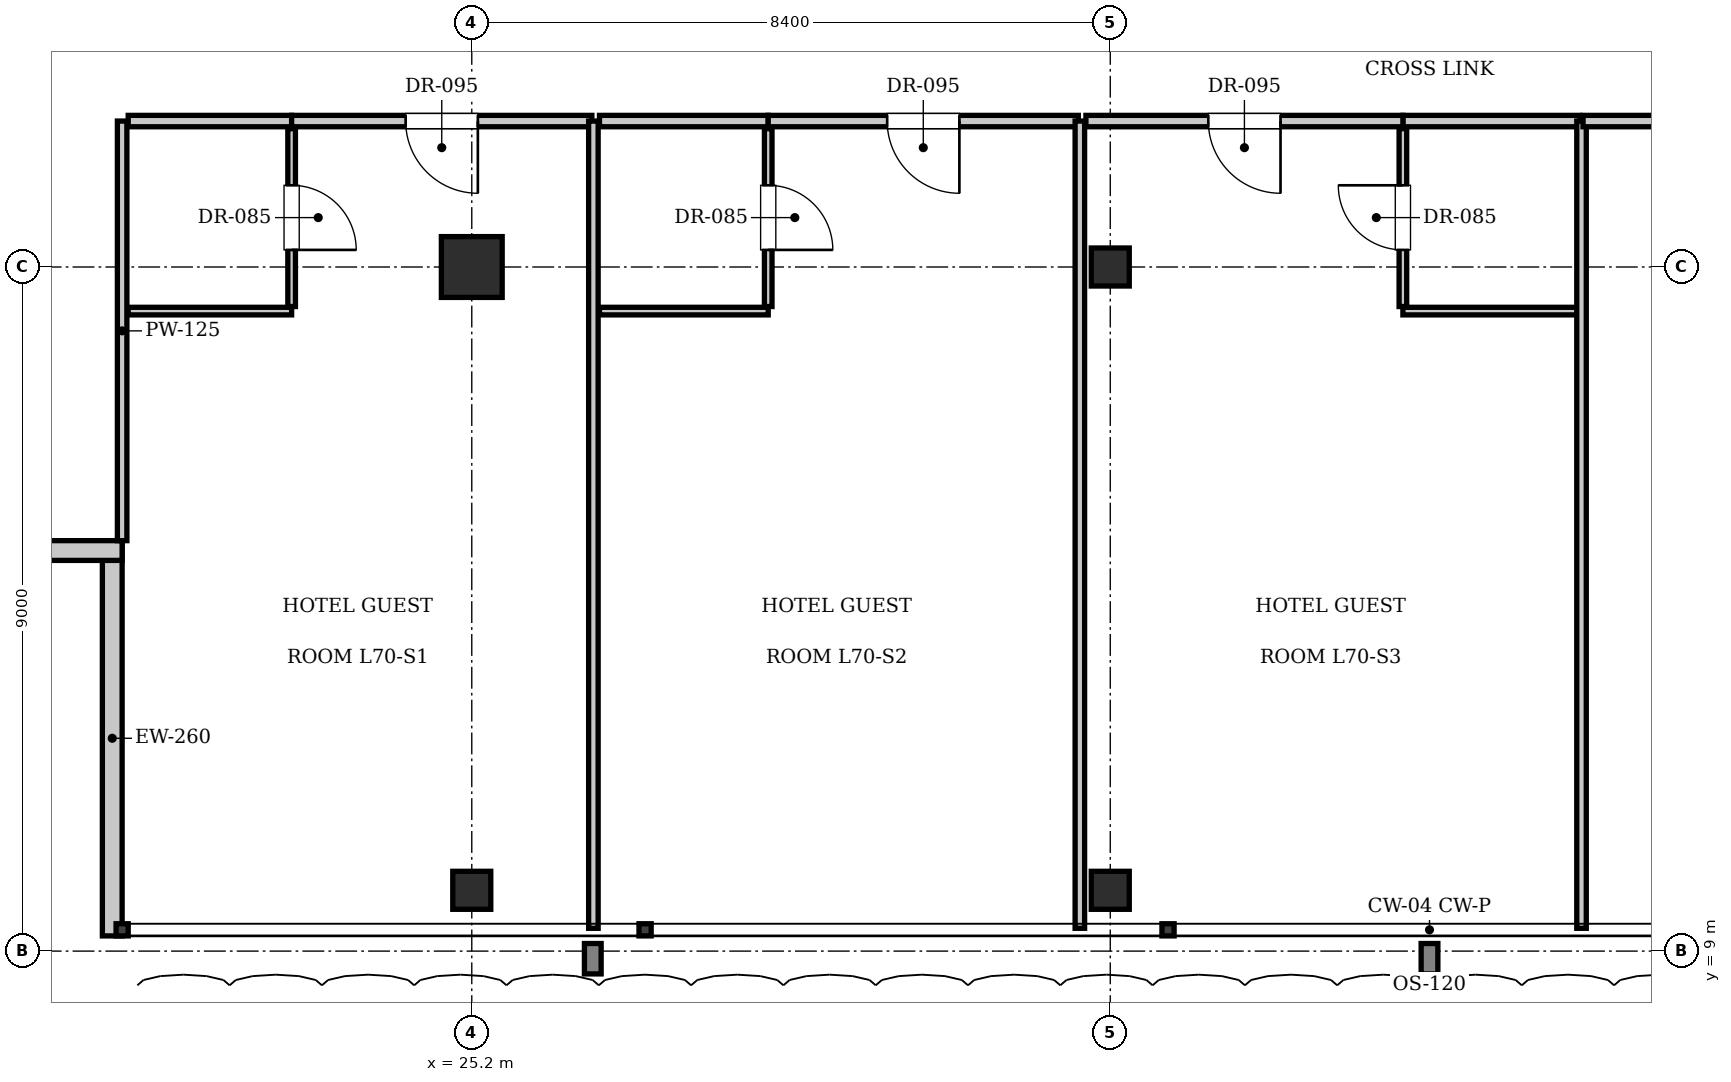
"""IFC4 building model, lengths in metres.
Left out: names, types, materials, properties, quantities, classifications, styles, units other than length and angle.
Written with IfcOpenShell. Run it as: python <this file> out.ifc"""

import sys

from ifc_helpers import new_model, si_unit, direction, frame, frame_2d, origin, origin_2d, place, context, subcontext, project, spatial, rectangle, i_section, extrude, element, fill, save


model = new_model("IFC4")
c1 = context("Model", 3, precision=1e-05, world=origin(), true_north=direction((0.0, 1.0)))
c2 = subcontext(c1, "Body", "Model", "MODEL_VIEW")
j1 = project(units=[si_unit("LENGTHUNIT", "METRE"), si_unit("PLANEANGLEUNIT", "RADIAN")], contexts=[c1])
p1 = place(None, origin())
s1 = spatial("IfcSite", under=j1, at=p1, CompositionType="ELEMENT")
p2 = place(p1, origin())
s2 = spatial("IfcBuilding", under=s1, at=p2, CompositionType="ELEMENT")
p3 = place(p2, frame((0.0, 0.0, 285.6)))
s3 = spatial("IfcBuildingStorey", under=s2, at=p3, CompositionType="ELEMENT", Elevation=285.6)
p4 = place(p3, frame((25.2, 18.0, 0.0), z_axis=(0.0, 0.0, 1.0), x_axis=(1.0, 0.0, 0.0)))
e1 = element("IfcColumn", 1, at=p4, inside=s3, PredefinedType="COLUMN", context=c2, shape_type="SweptSolid", body=[
    extrude(rectangle(XDim=0.8, YDim=0.8, at=origin_2d()), origin(), (0.0, 0.0, 1.0), 3.85),
])
for number, where, z_axis, x_axis in (
    (2, (33.6, 18.0, 0.0), (0.0, 0.0, 1.0), (1.0, 0.0, 0.0)),
    (3, (25.2, 9.8, 0.0), (0.0, 0.0, 1.0), (1.0, 0.0, 0.0)),
    (4, (33.6, 9.8, 0.0), (0.0, 0.0, 1.0), (1.0, 0.0, 0.0)),
):
    element("IfcColumn", number, at=place(p3, frame(where, z_axis=z_axis, x_axis=x_axis)), inside=s3, PredefinedType="COLUMN", context=c2, shape_type="SweptSolid", body=[
        extrude(i_section(OverallWidth=0.5, OverallDepth=0.5, WebThickness=0.022, FlangeThickness=0.032, at=origin_2d()), origin(), (0.0, 0.0, 1.0), 3.85),
    ])
p5 = place(p3, frame((20.47, 9.2, 0.0), z_axis=(0.0, 0.0, 1.0), x_axis=(0.0, 1.0, 0.0)))
e5 = element("IfcWall", 5, at=p5, inside=s3, PredefinedType="SOLIDWALL", context=c2, shape_type="SweptSolid", body=[
    extrude(rectangle(XDim=5.2, YDim=0.26, at=frame_2d((2.6, 0.0))), origin(), (0.0, 0.0, 1.0), 3.61),
])
p6 = place(p3, frame((20.6, 14.27, 0.0), z_axis=(0.0, 0.0, 1.0), x_axis=(-1.0, 0.0, 0.0)))
e6 = element("IfcWall", 6, at=p6, inside=s3, PredefinedType="SOLIDWALL", context=c2, shape_type="SweptSolid", body=[
    extrude(rectangle(XDim=5.2, YDim=0.26, at=frame_2d((2.6, 0.0))), origin(), (0.0, 0.0, 1.0), 3.61),
])
p7 = place(p6, frame((1.6, 0.0, 0.9)))
e7 = element("IfcOpeningElement", 7, at=p7, cuts=e6, PredefinedType="OPENING", context=c2, shape_type="SweptSolid", body=[
    extrude(rectangle(XDim=2.0, YDim=2.2, at=frame_2d((1.0, 1.1))), frame((0.0, 0.14, 0.0), z_axis=(0.0, -1.0, 0.0), x_axis=(1.0, 0.0, 0.0)), (0.0, 0.0, 1.0), 0.28),
])
p8 = place(p3, frame((20.6, 14.4, 0.0), z_axis=(0.0, 0.0, 1.0), x_axis=(0.0, 1.0, 0.0)))
e8 = element("IfcWall", 8, at=p8, inside=s3, PredefinedType="PARTITIONING", context=c2, shape_type="SweptSolid", body=[
    extrude(rectangle(XDim=5.52, YDim=0.125, at=frame_2d((2.76, 0.0))), origin(), (0.0, 0.0, 1.0), 3.61),
])
p9 = place(p3, frame((20.68, 19.92, 0.0), z_axis=(0.0, 0.0, 1.0), x_axis=(1.0, 0.0, 0.0)))
e9 = element("IfcWall", 9, at=p9, inside=s3, PredefinedType="PARTITIONING", context=c2, shape_type="SweptSolid", body=[
    extrude(rectangle(XDim=2.15, YDim=0.15, at=frame_2d((1.075, 0.0))), origin(), (0.0, 0.0, 1.0), 3.61),
])
p10 = place(p3, frame((20.68, 17.42, 0.0), z_axis=(0.0, 0.0, 1.0), x_axis=(1.0, 0.0, 0.0)))
e10 = element("IfcWall", 10, at=p10, inside=s3, PredefinedType="PARTITIONING", context=c2, shape_type="SweptSolid", body=[
    extrude(rectangle(XDim=2.15, YDim=0.1, at=frame_2d((1.075, 0.0))), origin(), (0.0, 0.0, 1.0), 3.61),
])
p11 = place(p3, frame((22.83, 17.48, 0.0), z_axis=(0.0, 0.0, 1.0), x_axis=(0.0, 1.0, 0.0)))
e11 = element("IfcWall", 11, at=p11, inside=s3, PredefinedType="PARTITIONING", context=c2, shape_type="SweptSolid", body=[
    extrude(rectangle(XDim=2.34, YDim=0.1, at=frame_2d((1.17, 0.0))), origin(), (0.0, 0.0, 1.0), 3.61),
])
p12 = place(p11, frame((0.745, 0.0, 0.0)))
e12 = element("IfcOpeningElement", 12, at=p12, cuts=e11, PredefinedType="OPENING", context=c2, shape_type="SweptSolid", body=[
    extrude(rectangle(XDim=0.85, YDim=2.1, at=frame_2d((0.425, 1.05))), frame((0.0, 0.06, 0.0), z_axis=(0.0, -1.0, 0.0), x_axis=(1.0, 0.0, 0.0)), (0.0, 0.0, 1.0), 0.12),
])
p13 = place(p3, frame((22.83, 19.92, 0.0), z_axis=(0.0, 0.0, 1.0), x_axis=(1.0, 0.0, 0.0)))
e13 = element("IfcWall", 13, at=p13, inside=s3, PredefinedType="PARTITIONING", context=c2, shape_type="SweptSolid", body=[
    extrude(rectangle(XDim=3.95, YDim=0.15, at=frame_2d((1.975, 0.0))), origin(), (0.0, 0.0, 1.0), 3.61),
])
p14 = place(p13, frame((1.5, 0.0, 0.0)))
e14 = element("IfcOpeningElement", 14, at=p14, cuts=e13, PredefinedType="OPENING", context=c2, shape_type="SweptSolid", body=[
    extrude(rectangle(XDim=0.95, YDim=2.15, at=frame_2d((0.475, 1.075))), frame((0.0, 0.085, 0.0), z_axis=(0.0, -1.0, 0.0), x_axis=(1.0, 0.0, 0.0)), (0.0, 0.0, 1.0), 0.17),
])
p15 = place(p3, frame((26.8, 9.3, 0.0), z_axis=(0.0, 0.0, 1.0), x_axis=(0.0, 1.0, 0.0)))
e15 = element("IfcWall", 15, at=p15, inside=s3, PredefinedType="PARTITIONING", context=c2, shape_type="SweptSolid", body=[
    extrude(rectangle(XDim=10.62, YDim=0.125, at=frame_2d((5.31, 0.0))), origin(), (0.0, 0.0, 1.0), 3.61),
])
p16 = place(p3, frame((26.88, 19.92, 0.0), z_axis=(0.0, 0.0, 1.0), x_axis=(1.0, 0.0, 0.0)))
e16 = element("IfcWall", 16, at=p16, inside=s3, PredefinedType="PARTITIONING", context=c2, shape_type="SweptSolid", body=[
    extrude(rectangle(XDim=2.22, YDim=0.15, at=frame_2d((1.11, 0.0))), origin(), (0.0, 0.0, 1.0), 3.61),
])
p17 = place(p3, frame((26.88, 17.42, 0.0), z_axis=(0.0, 0.0, 1.0), x_axis=(1.0, 0.0, 0.0)))
e17 = element("IfcWall", 17, at=p17, inside=s3, PredefinedType="PARTITIONING", context=c2, shape_type="SweptSolid", body=[
    extrude(rectangle(XDim=2.22, YDim=0.1, at=frame_2d((1.11, 0.0))), origin(), (0.0, 0.0, 1.0), 3.61),
])
p18 = place(p3, frame((29.1, 17.48, 0.0), z_axis=(0.0, 0.0, 1.0), x_axis=(0.0, 1.0, 0.0)))
e18 = element("IfcWall", 18, at=p18, inside=s3, PredefinedType="PARTITIONING", context=c2, shape_type="SweptSolid", body=[
    extrude(rectangle(XDim=2.34, YDim=0.1, at=frame_2d((1.17, 0.0))), origin(), (0.0, 0.0, 1.0), 3.61),
])
p19 = place(p18, frame((0.745, 0.0, 0.0)))
e19 = element("IfcOpeningElement", 19, at=p19, cuts=e18, PredefinedType="OPENING", context=c2, shape_type="SweptSolid", body=[
    extrude(rectangle(XDim=0.85, YDim=2.1, at=frame_2d((0.425, 1.05))), frame((0.0, 0.06, 0.0), z_axis=(0.0, -1.0, 0.0), x_axis=(1.0, 0.0, 0.0)), (0.0, 0.0, 1.0), 0.12),
])
p20 = place(p3, frame((29.1, 19.92, 0.0), z_axis=(0.0, 0.0, 1.0), x_axis=(1.0, 0.0, 0.0)))
e20 = element("IfcWall", 20, at=p20, inside=s3, PredefinedType="PARTITIONING", context=c2, shape_type="SweptSolid", body=[
    extrude(rectangle(XDim=4.08, YDim=0.15, at=frame_2d((2.04, 0.0))), origin(), (0.0, 0.0, 1.0), 3.61),
])
p21 = place(p20, frame((1.565, 0.0, 0.0)))
e21 = element("IfcOpeningElement", 21, at=p21, cuts=e20, PredefinedType="OPENING", context=c2, shape_type="SweptSolid", body=[
    extrude(rectangle(XDim=0.95, YDim=2.15, at=frame_2d((0.475, 1.075))), frame((0.0, 0.085, 0.0), z_axis=(0.0, -1.0, 0.0), x_axis=(1.0, 0.0, 0.0)), (0.0, 0.0, 1.0), 0.17),
])
p22 = place(p3, frame((33.2, 9.3, 0.0), z_axis=(0.0, 0.0, 1.0), x_axis=(0.0, 1.0, 0.0)))
e22 = element("IfcWall", 22, at=p22, inside=s3, PredefinedType="PARTITIONING", context=c2, shape_type="SweptSolid", body=[
    extrude(rectangle(XDim=10.62, YDim=0.125, at=frame_2d((5.31, 0.0))), origin(), (0.0, 0.0, 1.0), 3.61),
])
p23 = place(p3, frame((37.45, 19.92, 0.0), z_axis=(0.0, 0.0, 1.0), x_axis=(1.0, 0.0, 0.0)))
e23 = element("IfcWall", 23, at=p23, inside=s3, PredefinedType="PARTITIONING", context=c2, shape_type="SweptSolid", body=[
    extrude(rectangle(XDim=2.33, YDim=0.15, at=frame_2d((1.165, 0.0))), origin(), (0.0, 0.0, 1.0), 3.61),
])
p24 = place(p3, frame((37.45, 17.42, 0.0), z_axis=(0.0, 0.0, 1.0), x_axis=(1.0, 0.0, 0.0)))
e24 = element("IfcWall", 24, at=p24, inside=s3, PredefinedType="PARTITIONING", context=c2, shape_type="SweptSolid", body=[
    extrude(rectangle(XDim=2.31, YDim=0.1, at=frame_2d((1.155, 0.0))), origin(), (0.0, 0.0, 1.0), 3.61),
])
p25 = place(p3, frame((37.45, 17.48, 0.0), z_axis=(0.0, 0.0, 1.0), x_axis=(0.0, 1.0, 0.0)))
e25 = element("IfcWall", 25, at=p25, inside=s3, PredefinedType="PARTITIONING", context=c2, shape_type="SweptSolid", body=[
    extrude(rectangle(XDim=2.34, YDim=0.1, at=frame_2d((1.17, 0.0))), origin(), (0.0, 0.0, 1.0), 3.61),
])
p26 = place(p25, frame((0.745, 0.0, 0.0)))
e26 = element("IfcOpeningElement", 26, at=p26, cuts=e25, PredefinedType="OPENING", context=c2, shape_type="SweptSolid", body=[
    extrude(rectangle(XDim=0.85, YDim=2.1, at=frame_2d((0.425, 1.05))), frame((0.0, 0.06, 0.0), z_axis=(0.0, -1.0, 0.0), x_axis=(1.0, 0.0, 0.0)), (0.0, 0.0, 1.0), 0.12),
])
p27 = place(p3, frame((33.28, 19.92, 0.0), z_axis=(0.0, 0.0, 1.0), x_axis=(1.0, 0.0, 0.0)))
e27 = element("IfcWall", 27, at=p27, inside=s3, PredefinedType="PARTITIONING", context=c2, shape_type="SweptSolid", body=[
    extrude(rectangle(XDim=4.17, YDim=0.15, at=frame_2d((2.085, 0.0))), origin(), (0.0, 0.0, 1.0), 3.61),
])
p28 = place(p27, frame((1.61, 0.0, 0.0)))
e28 = element("IfcOpeningElement", 28, at=p28, cuts=e27, PredefinedType="OPENING", context=c2, shape_type="SweptSolid", body=[
    extrude(rectangle(XDim=0.95, YDim=2.15, at=frame_2d((0.475, 1.075))), frame((0.0, 0.085, 0.0), z_axis=(0.0, -1.0, 0.0), x_axis=(1.0, 0.0, 0.0)), (0.0, 0.0, 1.0), 0.17),
])
p29 = place(p3, frame((39.8, 9.3, 0.0), z_axis=(0.0, 0.0, 1.0), x_axis=(0.0, 1.0, 0.0)))
e29 = element("IfcWall", 29, at=p29, inside=s3, PredefinedType="PARTITIONING", context=c2, shape_type="SweptSolid", body=[
    extrude(rectangle(XDim=10.62, YDim=0.125, at=frame_2d((5.31, 0.0))), origin(), (0.0, 0.0, 1.0), 3.61),
])
p30 = place(p3, frame((39.82, 19.92, 0.0), z_axis=(0.0, 0.0, 1.0), x_axis=(1.0, 0.0, 0.0)))
e30 = element("IfcWall", 30, at=p30, inside=s3, PredefinedType="PARTITIONING", context=c2, shape_type="SweptSolid", body=[
    extrude(rectangle(XDim=2.59, YDim=0.15, at=frame_2d((1.295, 0.0))), origin(), (0.0, 0.0, 1.0), 3.61),
])
p31 = place(p12, frame((0.85, 0.0, 0.0), z_axis=(0.0, 0.0, 1.0), x_axis=(-1.0, 0.0, 0.0)))
e31 = element("IfcDoor", 31, at=p31, inside=s3, OperationType="SINGLE_SWING_RIGHT", PredefinedType="DOOR", context=c2, shape_type="SweptSolid", body=[
    extrude(rectangle(XDim=0.85, YDim=2.1, at=frame_2d((0.425, 1.05))), frame((0.0, 0.025, 0.0), z_axis=(0.0, -1.0, 0.0), x_axis=(1.0, 0.0, 0.0)), (0.0, 0.0, 1.0), 0.05),
])
fill(e12, e31)
p32 = place(p14, frame((0.95, 0.0, 0.0), z_axis=(0.0, 0.0, 1.0), x_axis=(-1.0, 0.0, 0.0)))
e32 = element("IfcDoor", 32, at=p32, inside=s3, OperationType="SINGLE_SWING_LEFT", PredefinedType="DOOR", context=c2, shape_type="SweptSolid", body=[
    extrude(rectangle(XDim=0.95, YDim=2.15, at=frame_2d((0.475, 1.075))), frame((0.0, 0.025, 0.0), z_axis=(0.0, -1.0, 0.0), x_axis=(1.0, 0.0, 0.0)), (0.0, 0.0, 1.0), 0.05),
])
fill(e14, e32)
p33 = place(p19, frame((0.85, 0.0, 0.0), z_axis=(0.0, 0.0, 1.0), x_axis=(-1.0, 0.0, 0.0)))
e33 = element("IfcDoor", 33, at=p33, inside=s3, OperationType="SINGLE_SWING_RIGHT", PredefinedType="DOOR", context=c2, shape_type="SweptSolid", body=[
    extrude(rectangle(XDim=0.85, YDim=2.1, at=frame_2d((0.425, 1.05))), frame((0.0, 0.025, 0.0), z_axis=(0.0, -1.0, 0.0), x_axis=(1.0, 0.0, 0.0)), (0.0, 0.0, 1.0), 0.05),
])
fill(e19, e33)
p34 = place(p21, frame((0.95, 0.0, 0.0), z_axis=(0.0, 0.0, 1.0), x_axis=(-1.0, 0.0, 0.0)))
e34 = element("IfcDoor", 34, at=p34, inside=s3, OperationType="SINGLE_SWING_LEFT", PredefinedType="DOOR", context=c2, shape_type="SweptSolid", body=[
    extrude(rectangle(XDim=0.95, YDim=2.15, at=frame_2d((0.475, 1.075))), frame((0.0, 0.025, 0.0), z_axis=(0.0, -1.0, 0.0), x_axis=(1.0, 0.0, 0.0)), (0.0, 0.0, 1.0), 0.05),
])
fill(e21, e34)
p35 = place(p26, origin())
e35 = element("IfcDoor", 35, at=p35, inside=s3, OperationType="SINGLE_SWING_RIGHT", PredefinedType="DOOR", context=c2, shape_type="SweptSolid", body=[
    extrude(rectangle(XDim=0.85, YDim=2.1, at=frame_2d((0.425, 1.05))), frame((0.0, 0.025, 0.0), z_axis=(0.0, -1.0, 0.0), x_axis=(1.0, 0.0, 0.0)), (0.0, 0.0, 1.0), 0.05),
])
fill(e26, e35)
p36 = place(p28, frame((0.95, 0.0, 0.0), z_axis=(0.0, 0.0, 1.0), x_axis=(-1.0, 0.0, 0.0)))
e36 = element("IfcDoor", 36, at=p36, inside=s3, OperationType="SINGLE_SWING_LEFT", PredefinedType="DOOR", context=c2, shape_type="SweptSolid", body=[
    extrude(rectangle(XDim=0.95, YDim=2.15, at=frame_2d((0.475, 1.075))), frame((0.0, 0.025, 0.0), z_axis=(0.0, -1.0, 0.0), x_axis=(1.0, 0.0, 0.0)), (0.0, 0.0, 1.0), 0.05),
])
fill(e28, e36)
save(model, sys.argv[1])
